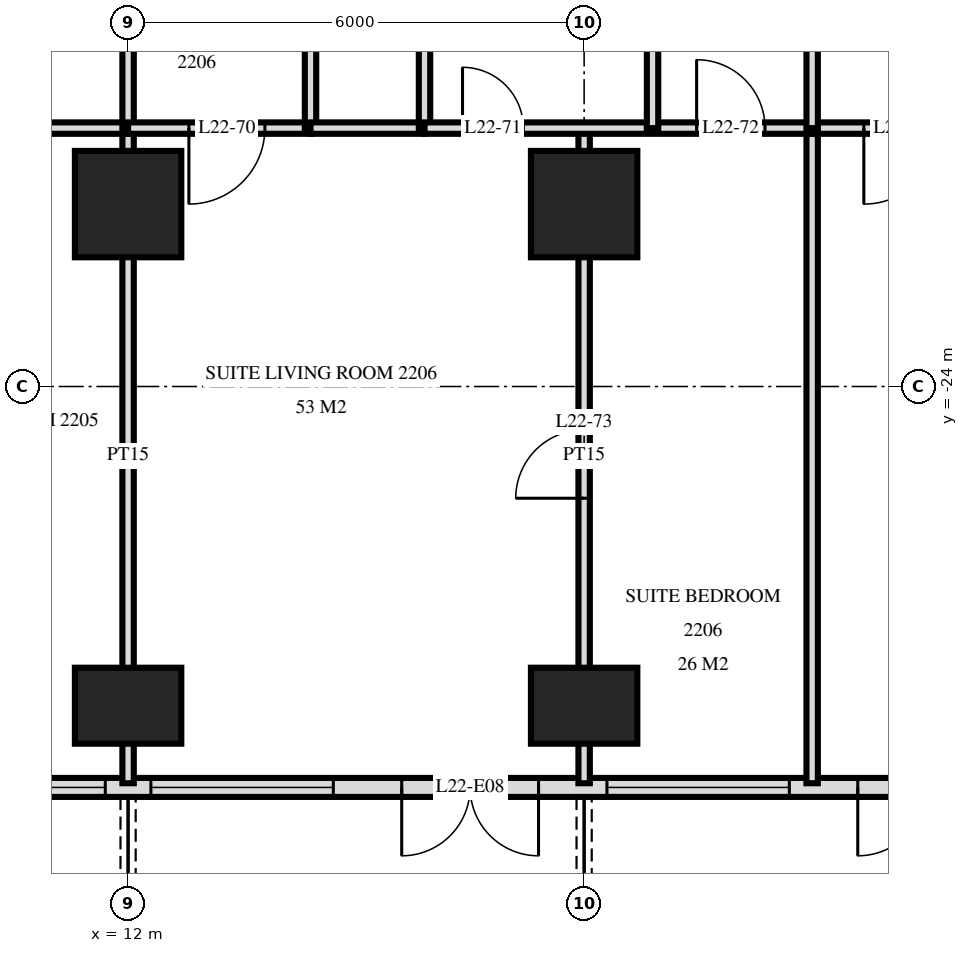
"""IFC4 building model, lengths in metres.
Left out: names, types, materials, properties, quantities, classifications, styles, units other than length and angle.
Written with IfcOpenShell. Run it as: python <this file> out.ifc"""

import sys

from ifc_helpers import new_model, si_unit, direction, frame, frame_2d, origin, origin_2d, place, context, subcontext, project, spatial, rectangle, extrude, element, fill, save


model = new_model("IFC4")
c1 = context("Model", 3, precision=1e-05, world=origin(), true_north=direction((0.0, 1.0)))
c2 = subcontext(c1, "Body", "Model", "MODEL_VIEW")
j1 = project(units=[si_unit("LENGTHUNIT", "METRE"), si_unit("PLANEANGLEUNIT", "RADIAN")], contexts=[c1])
p1 = place(None, origin())
s1 = spatial("IfcSite", under=j1, at=p1, CompositionType="ELEMENT")
p2 = place(p1, origin())
s2 = spatial("IfcBuilding", under=s1, at=p2, CompositionType="ELEMENT")
p3 = place(p2, frame((0.0, 0.0, 88.8)))
s3 = spatial("IfcBuildingStorey", under=s2, at=p3, CompositionType="ELEMENT", Elevation=88.8)
p4 = place(p3, frame((12.0, -28.2, 0.0), z_axis=(0.0, 0.0, 1.0), x_axis=(1.0, 0.0, 0.0)))
e1 = element("IfcColumn", 1, at=p4, inside=s3, PredefinedType="COLUMN", context=c2, shape_type="SweptSolid", body=[
    extrude(rectangle(XDim=1.4, YDim=1.0, at=origin_2d()), origin(), (0.0, 0.0, 1.0), 3.6),
])
p5 = place(p3, frame((12.0, -21.6, 0.0), z_axis=(0.0, 0.0, 1.0), x_axis=(1.0, 0.0, 0.0)))
e2 = element("IfcColumn", 2, at=p5, inside=s3, PredefinedType="COLUMN", context=c2, shape_type="SweptSolid", body=[
    extrude(rectangle(XDim=1.4, YDim=1.4, at=origin_2d()), origin(), (0.0, 0.0, 1.0), 3.6),
])
p6 = place(p3, frame((18.0, -28.2, 0.0), z_axis=(0.0, 0.0, 1.0), x_axis=(1.0, 0.0, 0.0)))
e3 = element("IfcColumn", 3, at=p6, inside=s3, PredefinedType="COLUMN", context=c2, shape_type="SweptSolid", body=[
    extrude(rectangle(XDim=1.4, YDim=1.0, at=origin_2d()), origin(), (0.0, 0.0, 1.0), 3.6),
])
p7 = place(p3, frame((18.0, -21.6, 0.0), z_axis=(0.0, 0.0, 1.0), x_axis=(1.0, 0.0, 0.0)))
e4 = element("IfcColumn", 4, at=p7, inside=s3, PredefinedType="COLUMN", context=c2, shape_type="SweptSolid", body=[
    extrude(rectangle(XDim=1.4, YDim=1.4, at=origin_2d()), origin(), (0.0, 0.0, 1.0), 3.6),
])
p8 = place(p3, frame((-28.775, -29.275, 0.0), z_axis=(0.0, 0.0, 1.0), x_axis=(1.0, 0.0, 0.0)))
e5 = element("IfcWall", 5, at=p8, inside=s3, PredefinedType="SOLIDWALL", context=c2, shape_type="SweptSolid", body=[
    extrude(rectangle(XDim=57.551, YDim=0.25, at=frame_2d((28.775, 0.0))), origin(), (0.0, 0.0, 1.0), 3.32),
])
p9 = place(p8, frame((0.575, 0.0, 0.0)))
e6 = element("IfcOpeningElement", 6, at=p9, cuts=e5, PredefinedType="OPENING", context=c2, shape_type="SweptSolid", body=[
    extrude(rectangle(XDim=1.8, YDim=2.4, at=frame_2d((0.9, 1.2))), frame((0.0, 0.135, 0.0), z_axis=(0.0, -1.0, 0.0), x_axis=(1.0, 0.0, 0.0)), (0.0, 0.0, 1.0), 0.27),
])
p10 = place(p8, frame((5.075, 0.0, 0.3)))
e7 = element("IfcOpeningElement", 7, at=p10, cuts=e5, PredefinedType="OPENING", context=c2, shape_type="SweptSolid", body=[
    extrude(rectangle(XDim=2.4, YDim=2.1, at=frame_2d((1.2, 1.05))), frame((0.0, 0.135, 0.0), z_axis=(0.0, -1.0, 0.0), x_axis=(1.0, 0.0, 0.0)), (0.0, 0.0, 1.0), 0.27),
])
p11 = place(p8, frame((8.375, 0.0, 0.0)))
e8 = element("IfcOpeningElement", 8, at=p11, cuts=e5, PredefinedType="OPENING", context=c2, shape_type="SweptSolid", body=[
    extrude(rectangle(XDim=1.8, YDim=2.4, at=frame_2d((0.9, 1.2))), frame((0.0, 0.135, 0.0), z_axis=(0.0, -1.0, 0.0), x_axis=(1.0, 0.0, 0.0)), (0.0, 0.0, 1.0), 0.27),
])
p12 = place(p8, frame((11.375, 0.0, 0.0)))
e9 = element("IfcOpeningElement", 9, at=p12, cuts=e5, PredefinedType="OPENING", context=c2, shape_type="SweptSolid", body=[
    extrude(rectangle(XDim=1.8, YDim=2.4, at=frame_2d((0.9, 1.2))), frame((0.0, 0.135, 0.0), z_axis=(0.0, -1.0, 0.0), x_axis=(1.0, 0.0, 0.0)), (0.0, 0.0, 1.0), 0.27),
])
p13 = place(p8, frame((14.075, 0.0, 0.3)))
e10 = element("IfcOpeningElement", 10, at=p13, cuts=e5, PredefinedType="OPENING", context=c2, shape_type="SweptSolid", body=[
    extrude(rectangle(XDim=2.4, YDim=2.1, at=frame_2d((1.2, 1.05))), frame((0.0, 0.135, 0.0), z_axis=(0.0, -1.0, 0.0), x_axis=(1.0, 0.0, 0.0)), (0.0, 0.0, 1.0), 0.27),
])
p14 = place(p8, frame((17.375, 0.0, 0.0)))
e11 = element("IfcOpeningElement", 11, at=p14, cuts=e5, PredefinedType="OPENING", context=c2, shape_type="SweptSolid", body=[
    extrude(rectangle(XDim=1.8, YDim=2.4, at=frame_2d((0.9, 1.2))), frame((0.0, 0.135, 0.0), z_axis=(0.0, -1.0, 0.0), x_axis=(1.0, 0.0, 0.0)), (0.0, 0.0, 1.0), 0.27),
])
p15 = place(p8, frame((20.075, 0.0, 0.3)))
e12 = element("IfcOpeningElement", 12, at=p15, cuts=e5, PredefinedType="OPENING", context=c2, shape_type="SweptSolid", body=[
    extrude(rectangle(XDim=2.4, YDim=2.1, at=frame_2d((1.2, 1.05))), frame((0.0, 0.135, 0.0), z_axis=(0.0, -1.0, 0.0), x_axis=(1.0, 0.0, 0.0)), (0.0, 0.0, 1.0), 0.27),
])
p16 = place(p8, frame((23.075, 0.0, 0.3)))
e13 = element("IfcOpeningElement", 13, at=p16, cuts=e5, PredefinedType="OPENING", context=c2, shape_type="SweptSolid", body=[
    extrude(rectangle(XDim=2.4, YDim=2.1, at=frame_2d((1.2, 1.05))), frame((0.0, 0.135, 0.0), z_axis=(0.0, -1.0, 0.0), x_axis=(1.0, 0.0, 0.0)), (0.0, 0.0, 1.0), 0.27),
])
p17 = place(p8, frame((26.375, 0.0, 0.0)))
e14 = element("IfcOpeningElement", 14, at=p17, cuts=e5, PredefinedType="OPENING", context=c2, shape_type="SweptSolid", body=[
    extrude(rectangle(XDim=1.8, YDim=2.4, at=frame_2d((0.9, 1.2))), frame((0.0, 0.135, 0.0), z_axis=(0.0, -1.0, 0.0), x_axis=(1.0, 0.0, 0.0)), (0.0, 0.0, 1.0), 0.27),
])
p18 = place(p8, frame((29.375, 0.0, 0.0)))
e15 = element("IfcOpeningElement", 15, at=p18, cuts=e5, PredefinedType="OPENING", context=c2, shape_type="SweptSolid", body=[
    extrude(rectangle(XDim=1.8, YDim=2.4, at=frame_2d((0.9, 1.2))), frame((0.0, 0.135, 0.0), z_axis=(0.0, -1.0, 0.0), x_axis=(1.0, 0.0, 0.0)), (0.0, 0.0, 1.0), 0.27),
])
p19 = place(p8, frame((32.075, 0.0, 0.3)))
e16 = element("IfcOpeningElement", 16, at=p19, cuts=e5, PredefinedType="OPENING", context=c2, shape_type="SweptSolid", body=[
    extrude(rectangle(XDim=2.4, YDim=2.1, at=frame_2d((1.2, 1.05))), frame((0.0, 0.135, 0.0), z_axis=(0.0, -1.0, 0.0), x_axis=(1.0, 0.0, 0.0)), (0.0, 0.0, 1.0), 0.27),
])
p20 = place(p8, frame((35.375, 0.0, 0.0)))
e17 = element("IfcOpeningElement", 17, at=p20, cuts=e5, PredefinedType="OPENING", context=c2, shape_type="SweptSolid", body=[
    extrude(rectangle(XDim=1.8, YDim=2.4, at=frame_2d((0.9, 1.2))), frame((0.0, 0.135, 0.0), z_axis=(0.0, -1.0, 0.0), x_axis=(1.0, 0.0, 0.0)), (0.0, 0.0, 1.0), 0.27),
])
p21 = place(p8, frame((38.075, 0.0, 0.3)))
e18 = element("IfcOpeningElement", 18, at=p21, cuts=e5, PredefinedType="OPENING", context=c2, shape_type="SweptSolid", body=[
    extrude(rectangle(XDim=2.4, YDim=2.1, at=frame_2d((1.2, 1.05))), frame((0.0, 0.135, 0.0), z_axis=(0.0, -1.0, 0.0), x_axis=(1.0, 0.0, 0.0)), (0.0, 0.0, 1.0), 0.27),
])
p22 = place(p8, frame((41.075, 0.0, 0.3)))
e19 = element("IfcOpeningElement", 19, at=p22, cuts=e5, PredefinedType="OPENING", context=c2, shape_type="SweptSolid", body=[
    extrude(rectangle(XDim=2.4, YDim=2.1, at=frame_2d((1.2, 1.05))), frame((0.0, 0.135, 0.0), z_axis=(0.0, -1.0, 0.0), x_axis=(1.0, 0.0, 0.0)), (0.0, 0.0, 1.0), 0.27),
])
p23 = place(p8, frame((44.375, 0.0, 0.0)))
e20 = element("IfcOpeningElement", 20, at=p23, cuts=e5, PredefinedType="OPENING", context=c2, shape_type="SweptSolid", body=[
    extrude(rectangle(XDim=1.8, YDim=2.4, at=frame_2d((0.9, 1.2))), frame((0.0, 0.135, 0.0), z_axis=(0.0, -1.0, 0.0), x_axis=(1.0, 0.0, 0.0)), (0.0, 0.0, 1.0), 0.27),
])
p24 = place(p8, frame((47.075, 0.0, 0.3)))
e21 = element("IfcOpeningElement", 21, at=p24, cuts=e5, PredefinedType="OPENING", context=c2, shape_type="SweptSolid", body=[
    extrude(rectangle(XDim=2.4, YDim=2.1, at=frame_2d((1.2, 1.05))), frame((0.0, 0.135, 0.0), z_axis=(0.0, -1.0, 0.0), x_axis=(1.0, 0.0, 0.0)), (0.0, 0.0, 1.0), 0.27),
])
p25 = place(p8, frame((50.375, 0.0, 0.0)))
e22 = element("IfcOpeningElement", 22, at=p25, cuts=e5, PredefinedType="OPENING", context=c2, shape_type="SweptSolid", body=[
    extrude(rectangle(XDim=1.8, YDim=2.4, at=frame_2d((0.9, 1.2))), frame((0.0, 0.135, 0.0), z_axis=(0.0, -1.0, 0.0), x_axis=(1.0, 0.0, 0.0)), (0.0, 0.0, 1.0), 0.27),
])
p26 = place(p8, frame((53.375, 0.0, 0.0)))
e23 = element("IfcOpeningElement", 23, at=p26, cuts=e5, PredefinedType="OPENING", context=c2, shape_type="SweptSolid", body=[
    extrude(rectangle(XDim=1.8, YDim=2.4, at=frame_2d((0.9, 1.2))), frame((0.0, 0.135, 0.0), z_axis=(0.0, -1.0, 0.0), x_axis=(1.0, 0.0, 0.0)), (0.0, 0.0, 1.0), 0.27),
])
p27 = place(p3, frame((21.0, -20.6, 0.0), z_axis=(0.0, 0.0, 1.0), x_axis=(0.0, 1.0, 0.0)))
e24 = element("IfcWall", 24, at=p27, inside=s3, PredefinedType="PARTITIONING", context=c2, shape_type="SweptSolid", body=[
    extrude(rectangle(XDim=3.6, YDim=0.15, at=frame_2d((1.8, 0.0))), origin(), (0.0, 0.0, 1.0), 3.32),
])
p28 = place(p3, frame((21.0, -29.22, 0.0), z_axis=(0.0, 0.0, 1.0), x_axis=(0.0, 1.0, 0.0)))
e25 = element("IfcWall", 25, at=p28, inside=s3, PredefinedType="PARTITIONING", context=c2, shape_type="SweptSolid", body=[
    extrude(rectangle(XDim=8.62, YDim=0.15, at=frame_2d((4.31, 0.0))), origin(), (0.0, 0.0, 1.0), 3.32),
])
p29 = place(p3, frame((18.9, -20.6, 0.0), z_axis=(0.0, 0.0, 1.0), x_axis=(0.0, 1.0, 0.0)))
e26 = element("IfcWall", 26, at=p29, inside=s3, PredefinedType="PARTITIONING", context=c2, shape_type="SweptSolid", body=[
    extrude(rectangle(XDim=3.6, YDim=0.15, at=frame_2d((1.8, 0.0))), origin(), (0.0, 0.0, 1.0), 3.32),
])
p30 = place(p3, frame((18.0, -29.22, 0.0), z_axis=(0.0, 0.0, 1.0), x_axis=(0.0, 1.0, 0.0)))
e27 = element("IfcWall", 27, at=p30, inside=s3, PredefinedType="PARTITIONING", context=c2, shape_type="SweptSolid", body=[
    extrude(rectangle(XDim=8.62, YDim=0.15, at=frame_2d((4.31, 0.0))), origin(), (0.0, 0.0, 1.0), 3.32),
])
p31 = place(p30, frame((3.75, 0.0, 0.0)))
e28 = element("IfcOpeningElement", 28, at=p31, cuts=e27, PredefinedType="OPENING", context=c2, shape_type="SweptSolid", body=[
    extrude(rectangle(XDim=0.9, YDim=2.1, at=frame_2d((0.45, 1.05))), frame((0.0, 0.085, 0.0), z_axis=(0.0, -1.0, 0.0), x_axis=(1.0, 0.0, 0.0)), (0.0, 0.0, 1.0), 0.17),
])
p32 = place(p3, frame((15.9, -20.6, 0.0), z_axis=(0.0, 0.0, 1.0), x_axis=(0.0, 1.0, 0.0)))
e29 = element("IfcWall", 29, at=p32, inside=s3, PredefinedType="PLUMBINGWALL", context=c2, shape_type="SweptSolid", body=[
    extrude(rectangle(XDim=3.6, YDim=0.15, at=frame_2d((1.8, 0.0))), origin(), (0.0, 0.0, 1.0), 3.32),
])
p33 = place(p3, frame((14.4, -20.6, 0.0), z_axis=(0.0, 0.0, 1.0), x_axis=(0.0, 1.0, 0.0)))
e30 = element("IfcWall", 30, at=p33, inside=s3, PredefinedType="PARTITIONING", context=c2, shape_type="SweptSolid", body=[
    extrude(rectangle(XDim=3.6, YDim=0.15, at=frame_2d((1.8, 0.0))), origin(), (0.0, 0.0, 1.0), 3.32),
])
p34 = place(p33, frame((1.3, 0.0, 0.0)))
e31 = element("IfcOpeningElement", 31, at=p34, cuts=e30, PredefinedType="OPENING", context=c2, shape_type="SweptSolid", body=[
    extrude(rectangle(XDim=1.0, YDim=2.1, at=frame_2d((0.5, 1.05))), frame((0.0, 0.085, 0.0), z_axis=(0.0, -1.0, 0.0), x_axis=(1.0, 0.0, 0.0)), (0.0, 0.0, 1.0), 0.17),
])
p35 = place(p3, frame((12.0, -20.6, 0.0), z_axis=(0.0, 0.0, 1.0), x_axis=(0.0, 1.0, 0.0)))
e32 = element("IfcWall", 32, at=p35, inside=s3, PredefinedType="PARTITIONING", context=c2, shape_type="SweptSolid", body=[
    extrude(rectangle(XDim=3.6, YDim=0.15, at=frame_2d((1.8, 0.0))), origin(), (0.0, 0.0, 1.0), 3.32),
])
p36 = place(p3, frame((12.0, -29.22, 0.0), z_axis=(0.0, 0.0, 1.0), x_axis=(0.0, 1.0, 0.0)))
e33 = element("IfcWall", 33, at=p36, inside=s3, PredefinedType="PARTITIONING", context=c2, shape_type="SweptSolid", body=[
    extrude(rectangle(XDim=8.62, YDim=0.15, at=frame_2d((4.31, 0.0))), origin(), (0.0, 0.0, 1.0), 3.32),
])
p37 = place(p3, frame((12.0, -20.6, 0.0), z_axis=(0.0, 0.0, 1.0), x_axis=(1.0, 0.0, 0.0)))
e34 = element("IfcWall", 34, at=p37, inside=s3, PredefinedType="PARTITIONING", context=c2, shape_type="SweptSolid", body=[
    extrude(rectangle(XDim=2.4, YDim=0.15, at=frame_2d((1.2, 0.0))), origin(), (0.0, 0.0, 1.0), 3.32),
])
p38 = place(p37, frame((0.8, 0.0, 0.0)))
e35 = element("IfcOpeningElement", 35, at=p38, cuts=e34, PredefinedType="OPENING", context=c2, shape_type="SweptSolid", body=[
    extrude(rectangle(XDim=1.0, YDim=2.1, at=frame_2d((0.5, 1.05))), frame((0.0, 0.085, 0.0), z_axis=(0.0, -1.0, 0.0), x_axis=(1.0, 0.0, 0.0)), (0.0, 0.0, 1.0), 0.17),
])
p39 = place(p3, frame((21.0, -20.6, 0.0), z_axis=(0.0, 0.0, 1.0), x_axis=(1.0, 0.0, 0.0)))
e36 = element("IfcWall", 36, at=p39, inside=s3, PredefinedType="PARTITIONING", context=c2, shape_type="SweptSolid", body=[
    extrude(rectangle(XDim=2.4, YDim=0.15, at=frame_2d((1.2, 0.0))), origin(), (0.0, 0.0, 1.0), 3.32),
])
p40 = place(p39, frame((0.68, 0.0, 0.0)))
e37 = element("IfcOpeningElement", 37, at=p40, cuts=e36, PredefinedType="OPENING", context=c2, shape_type="SweptSolid", body=[
    extrude(rectangle(XDim=1.0, YDim=2.1, at=frame_2d((0.5, 1.05))), frame((0.0, 0.085, 0.0), z_axis=(0.0, -1.0, 0.0), x_axis=(1.0, 0.0, 0.0)), (0.0, 0.0, 1.0), 0.17),
])
p41 = place(p3, frame((10.3, -20.6, 0.0), z_axis=(0.0, 0.0, 1.0), x_axis=(1.0, 0.0, 0.0)))
e38 = element("IfcWall", 38, at=p41, inside=s3, PredefinedType="PARTITIONING", context=c2, shape_type="SweptSolid", body=[
    extrude(rectangle(XDim=1.7, YDim=0.15, at=frame_2d((0.85, 0.0))), origin(), (0.0, 0.0, 1.0), 3.32),
])
p42 = place(p3, frame((15.9, -20.6, 0.0), z_axis=(0.0, 0.0, 1.0), x_axis=(1.0, 0.0, 0.0)))
e39 = element("IfcWall", 39, at=p42, inside=s3, PredefinedType="PARTITIONING", context=c2, shape_type="SweptSolid", body=[
    extrude(rectangle(XDim=5.1, YDim=0.15, at=frame_2d((2.55, 0.0))), origin(), (0.0, 0.0, 1.0), 3.32),
])
p43 = place(p42, frame((0.5, 0.0, 0.0)))
e40 = element("IfcOpeningElement", 40, at=p43, cuts=e39, PredefinedType="OPENING", context=c2, shape_type="SweptSolid", body=[
    extrude(rectangle(XDim=0.8, YDim=2.1, at=frame_2d((0.4, 1.05))), frame((0.0, 0.085, 0.0), z_axis=(0.0, -1.0, 0.0), x_axis=(1.0, 0.0, 0.0)), (0.0, 0.0, 1.0), 0.17),
])
p44 = place(p42, frame((3.58, 0.0, 0.0)))
e41 = element("IfcOpeningElement", 41, at=p44, cuts=e39, PredefinedType="OPENING", context=c2, shape_type="SweptSolid", body=[
    extrude(rectangle(XDim=0.9, YDim=2.1, at=frame_2d((0.45, 1.05))), frame((0.0, 0.085, 0.0), z_axis=(0.0, -1.0, 0.0), x_axis=(1.0, 0.0, 0.0)), (0.0, 0.0, 1.0), 0.17),
])
p45 = place(p3, frame((14.4, -20.6, 0.0), z_axis=(0.0, 0.0, 1.0), x_axis=(1.0, 0.0, 0.0)))
e42 = element("IfcWall", 42, at=p45, inside=s3, PredefinedType="PLUMBINGWALL", context=c2, shape_type="SweptSolid", body=[
    extrude(rectangle(XDim=1.5, YDim=0.15, at=frame_2d((0.75, 0.0))), origin(), (0.0, 0.0, 1.0), 3.32),
])
p46 = place(p21, origin())
e43 = element("IfcWindow", 43, at=p46, inside=s3, PartitioningType="SINGLE_PANEL", PredefinedType="WINDOW", context=c2, shape_type="SweptSolid", body=[
    extrude(rectangle(XDim=2.4, YDim=2.1, at=frame_2d((1.2, 1.05))), frame((0.0, 0.03, 0.0), z_axis=(0.0, -1.0, 0.0), x_axis=(1.0, 0.0, 0.0)), (0.0, 0.0, 1.0), 0.06),
])
fill(e18, e43)
p47 = place(p22, origin())
e44 = element("IfcWindow", 44, at=p47, inside=s3, PartitioningType="SINGLE_PANEL", PredefinedType="WINDOW", context=c2, shape_type="SweptSolid", body=[
    extrude(rectangle(XDim=2.4, YDim=2.1, at=frame_2d((1.2, 1.05))), frame((0.0, 0.03, 0.0), z_axis=(0.0, -1.0, 0.0), x_axis=(1.0, 0.0, 0.0)), (0.0, 0.0, 1.0), 0.06),
])
fill(e19, e44)
p48 = place(p23, frame((0.9, 0.0, 0.0), z_axis=(0.0, 0.0, 1.0), x_axis=(-1.0, 0.0, 0.0)))
e45 = element("IfcDoor", 45, at=p48, inside=s3, OperationType="DOUBLE_DOOR_SINGLE_SWING", PredefinedType="DOOR", context=c2, shape_type="SweptSolid", body=[
    extrude(rectangle(XDim=1.8, YDim=2.4, at=frame_2d((0.0, 1.2))), frame((0.0, -0.025, 0.0), z_axis=(0.0, 1.0, 0.0), x_axis=(-1.0, 0.0, 0.0)), (0.0, 0.0, 1.0), 0.05),
])
fill(e20, e45)
p49 = place(p24, origin())
e46 = element("IfcWindow", 46, at=p49, inside=s3, PartitioningType="SINGLE_PANEL", PredefinedType="WINDOW", context=c2, shape_type="SweptSolid", body=[
    extrude(rectangle(XDim=2.4, YDim=2.1, at=frame_2d((1.2, 1.05))), frame((0.0, 0.03, 0.0), z_axis=(0.0, -1.0, 0.0), x_axis=(1.0, 0.0, 0.0)), (0.0, 0.0, 1.0), 0.06),
])
fill(e21, e46)
p50 = place(p25, frame((0.9, 0.0, 0.0), z_axis=(0.0, 0.0, 1.0), x_axis=(-1.0, 0.0, 0.0)))
e47 = element("IfcDoor", 47, at=p50, inside=s3, OperationType="DOUBLE_DOOR_SINGLE_SWING", PredefinedType="DOOR", context=c2, shape_type="SweptSolid", body=[
    extrude(rectangle(XDim=1.8, YDim=2.4, at=frame_2d((0.0, 1.2))), frame((0.0, -0.025, 0.0), z_axis=(0.0, 1.0, 0.0), x_axis=(-1.0, 0.0, 0.0)), (0.0, 0.0, 1.0), 0.05),
])
fill(e22, e47)
p51 = place(p38, frame((0.5, 0.0, 0.0), z_axis=(0.0, 0.0, 1.0), x_axis=(-1.0, 0.0, 0.0)))
e48 = element("IfcDoor", 48, at=p51, inside=s3, OperationType="SINGLE_SWING_LEFT", PredefinedType="DOOR", context=c2, shape_type="SweptSolid", body=[
    extrude(rectangle(XDim=1.0, YDim=2.1, at=frame_2d((0.0, 1.05))), frame((0.0, -0.025, 0.0), z_axis=(0.0, 1.0, 0.0), x_axis=(-1.0, 0.0, 0.0)), (0.0, 0.0, 1.0), 0.05),
])
fill(e35, e48)
p52 = place(p43, origin())
e49 = element("IfcDoor", 49, at=p52, inside=s3, OperationType="SINGLE_SWING_RIGHT", PredefinedType="DOOR", context=c2, shape_type="SweptSolid", body=[
    extrude(rectangle(XDim=0.8, YDim=2.1, at=frame_2d((0.4, 1.05))), frame((0.0, 0.025, 0.0), z_axis=(0.0, -1.0, 0.0), x_axis=(1.0, 0.0, 0.0)), (0.0, 0.0, 1.0), 0.05),
])
fill(e40, e49)
p53 = place(p44, origin())
e50 = element("IfcDoor", 50, at=p53, inside=s3, OperationType="SINGLE_SWING_RIGHT", PredefinedType="DOOR", context=c2, shape_type="SweptSolid", body=[
    extrude(rectangle(XDim=0.9, YDim=2.1, at=frame_2d((0.45, 1.05))), frame((0.0, 0.025, 0.0), z_axis=(0.0, -1.0, 0.0), x_axis=(1.0, 0.0, 0.0)), (0.0, 0.0, 1.0), 0.05),
])
fill(e41, e50)
p54 = place(p31, origin())
e51 = element("IfcDoor", 51, at=p54, inside=s3, OperationType="SINGLE_SWING_RIGHT", PredefinedType="DOOR", context=c2, shape_type="SweptSolid", body=[
    extrude(rectangle(XDim=0.9, YDim=2.1, at=frame_2d((0.45, 1.05))), frame((0.0, 0.025, 0.0), z_axis=(0.0, -1.0, 0.0), x_axis=(1.0, 0.0, 0.0)), (0.0, 0.0, 1.0), 0.05),
])
fill(e28, e51)
p55 = place(p40, frame((0.5, 0.0, 0.0), z_axis=(0.0, 0.0, 1.0), x_axis=(-1.0, 0.0, 0.0)))
e52 = element("IfcDoor", 52, at=p55, inside=s3, OperationType="SINGLE_SWING_LEFT", PredefinedType="DOOR", context=c2, shape_type="SweptSolid", body=[
    extrude(rectangle(XDim=1.0, YDim=2.1, at=frame_2d((0.0, 1.05))), frame((0.0, -0.025, 0.0), z_axis=(0.0, 1.0, 0.0), x_axis=(-1.0, 0.0, 0.0)), (0.0, 0.0, 1.0), 0.05),
])
fill(e37, e52)
save(model, sys.argv[1])
